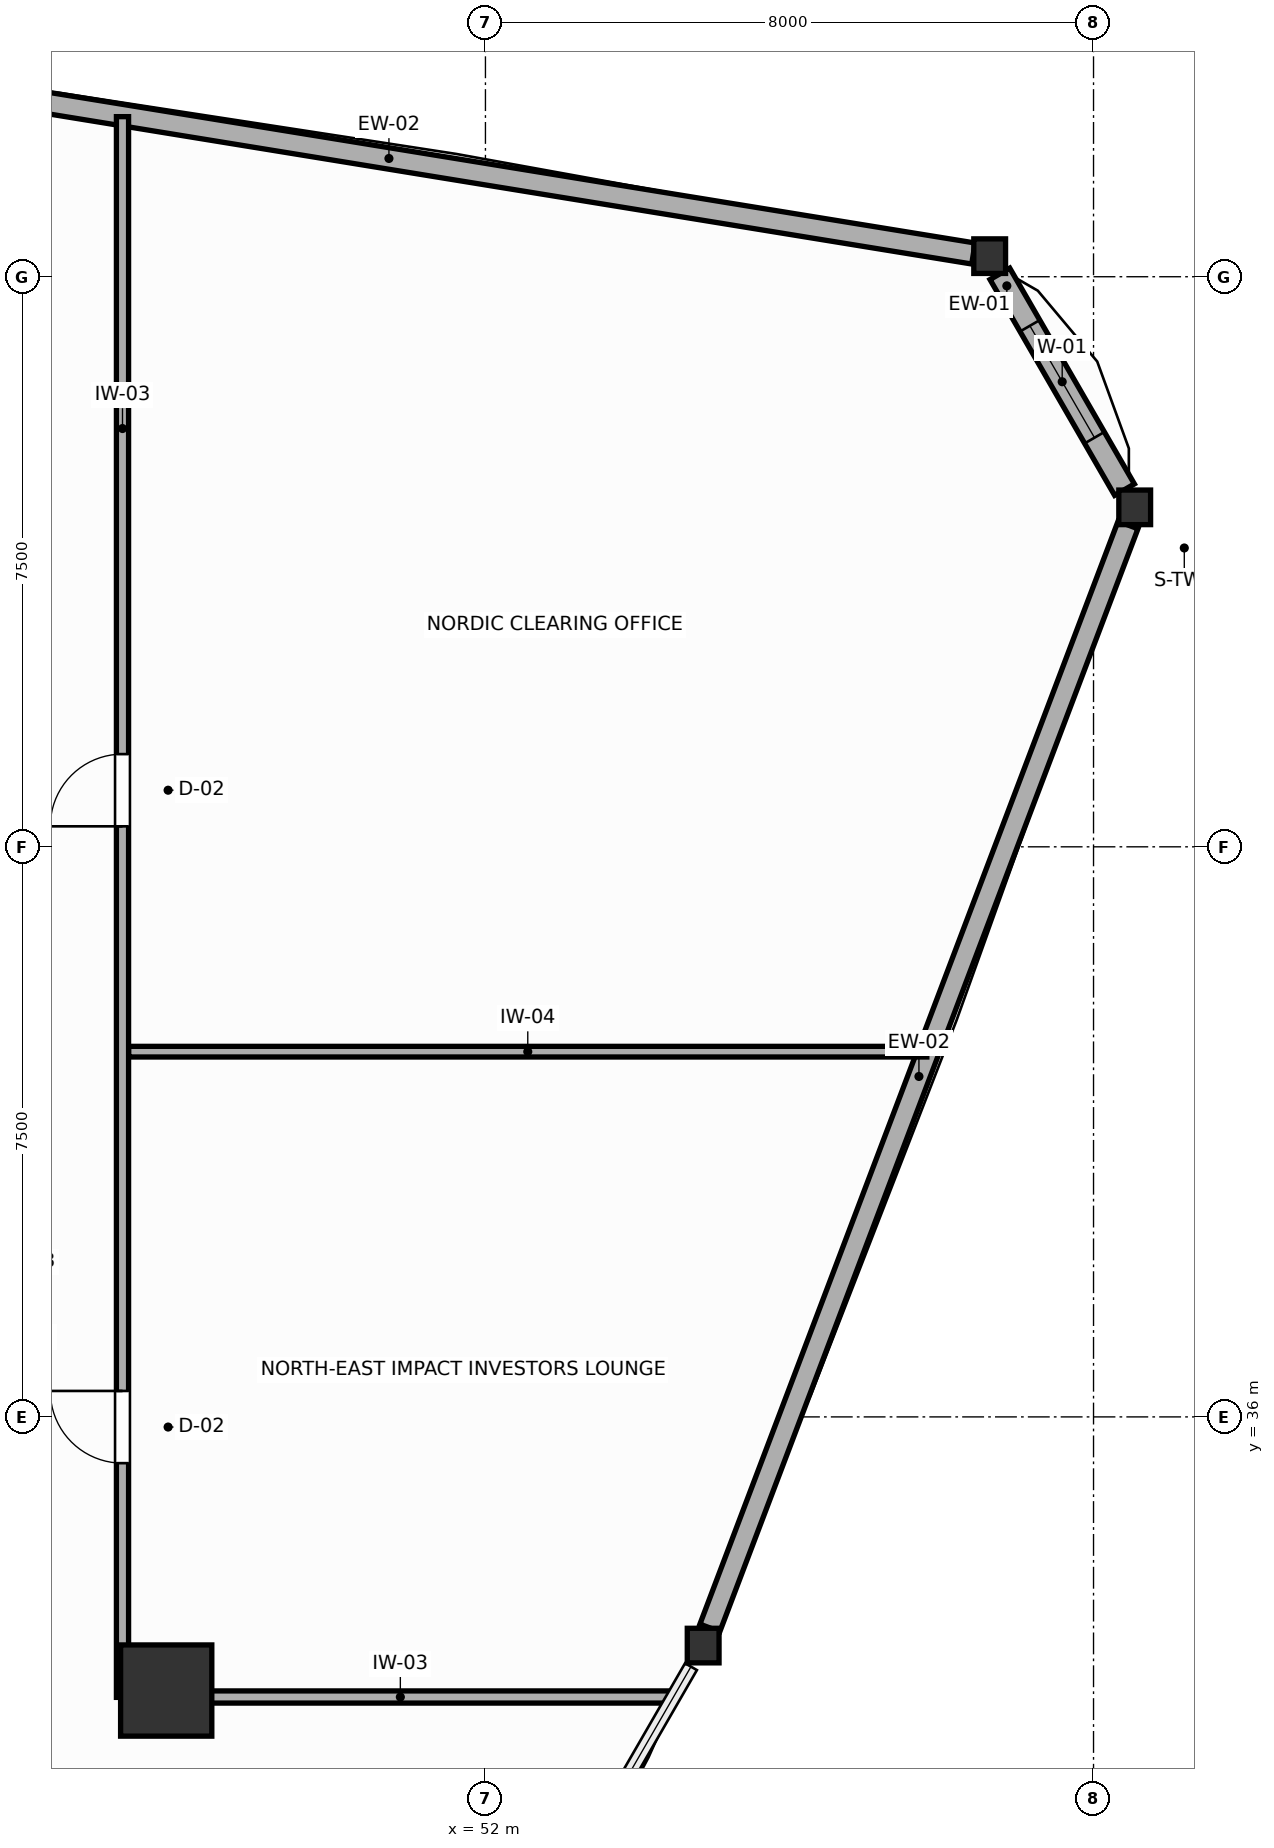
"""IFC4 building model, lengths in metres.
Left out: names, types, materials, properties, quantities, classifications, styles, units other than length and angle.
Written with IfcOpenShell. Run it as: python <this file> out.ifc"""

import sys

from ifc_helpers import new_model, si_unit, direction, frame, frame_2d, origin, origin_2d, place, context, subcontext, project, spatial, rectangle, i_section, extrude, source, transform, mapped, element, fill, save


model = new_model("IFC4")
c1 = context("Model", 3, precision=1e-05, world=origin(), true_north=direction((0.0, 1.0)))
c2 = subcontext(c1, "Body", "Model", "MODEL_VIEW")
j1 = project(units=[si_unit("LENGTHUNIT", "METRE"), si_unit("PLANEANGLEUNIT", "RADIAN")], contexts=[c1])
p1 = place(None, origin())
s1 = spatial("IfcSite", under=j1, at=p1, CompositionType="ELEMENT")
p2 = place(p1, origin())
s2 = spatial("IfcBuilding", under=s1, at=p2, CompositionType="ELEMENT")
p3 = place(p2, frame((0.0, 0.0, 124.2)))
s3 = spatial("IfcBuildingStorey", under=s2, at=p3, CompositionType="ELEMENT", Elevation=124.2)
m1 = source(origin(), c2, "Body", "SweptSolid", [
    extrude(rectangle(XDim=1.2, YDim=1.2, at=origin_2d()), origin(), (0.0, 0.0, 1.0), 3.6),
])
p4 = place(p3, frame((47.8, 32.4, 0.0), z_axis=(0.0, 0.0, 1.0), x_axis=(1.0, 0.0, 0.0)))
e1 = element("IfcColumn", 1, at=p4, inside=s3, PredefinedType="COLUMN", context=c2, shape_type="MappedRepresentation", body=[
    mapped(m1, transform((0.0, 0.0, 0.0), scale=1.0)),
])
m2 = source(origin(), c2, "Body", "SweptSolid", [
    extrude(i_section(OverallWidth=0.418, OverallDepth=0.455, WebThickness=0.039, FlangeThickness=0.063, FilletRadius=0.015, at=origin_2d()), origin(), (0.0, 0.0, 1.0), 3.6),
])
for number, where, z_axis, x_axis in (
    (2, (60.542, 47.966, 0.0), (0.0, 0.0, 1.0), (1.0, 0.0, 0.0)),
    (3, (58.634, 51.271, 0.0), (0.0, 0.0, 1.0), (1.0, 0.0, 0.0)),
    (4, (54.864, 32.991, 0.0), (0.0, 0.0, 1.0), (1.0, 0.0, 0.0)),
):
    element("IfcColumn", number, at=place(p3, frame(where, z_axis=z_axis, x_axis=x_axis)), inside=s3, PredefinedType="COLUMN", context=c2, shape_type="MappedRepresentation", body=[
        mapped(m2, transform((0.0, 0.0, 0.0), scale=1.0)),
    ])
p5 = place(p3, frame((60.408, 48.198, 0.0), z_axis=(0.0, 0.0, 1.0), x_axis=(-0.500014611105, 0.866016967894, 0.0)))
e5 = element("IfcWall", 5, at=p5, inside=s3, PredefinedType="SOLIDWALL", context=c2, shape_type="SweptSolid", body=[
    extrude(rectangle(XDim=3.279, YDim=0.3, at=frame_2d((1.64, 0.0))), origin(), (0.0, 0.0, 1.0), 3.0),
])
p6 = place(p5, frame((0.79, 0.0, 0.75)))
e6 = element("IfcOpeningElement", 6, at=p6, cuts=e5, PredefinedType="OPENING", context=c2, shape_type="SweptSolid", body=[
    extrude(rectangle(XDim=1.7, YDim=1.75, at=frame_2d((0.85, 0.875))), frame((0.0, 0.16, 0.0), z_axis=(0.0, -1.0, 0.0), x_axis=(1.0, 0.0, 0.0)), (0.0, 0.0, 1.0), 0.32),
])
p7 = place(p3, frame((58.42, 51.306, 0.0), z_axis=(0.0, 0.0, 1.0), x_axis=(-0.987036263752, 0.160497395736, 0.0)))
e7 = element("IfcWall", 7, at=p7, inside=s3, PredefinedType="SOLIDWALL", context=c2, shape_type="SweptSolid", body=[
    extrude(rectangle(XDim=15.581, YDim=0.28, at=frame_2d((7.791, 0.0))), origin(), (0.0, 0.0, 1.0), 3.0),
])
p8 = place(p3, frame((54.952, 33.224, 0.0), z_axis=(0.0, 0.0, 1.0), x_axis=(0.354519532047, 0.935048609109, 0.0)))
e8 = element("IfcWall", 8, at=p8, inside=s3, PredefinedType="SOLIDWALL", context=c2, shape_type="SweptSolid", body=[
    extrude(rectangle(XDim=15.517, YDim=0.28, at=frame_2d((7.759, 0.0))), origin(), (0.0, 0.0, 1.0), 3.0),
])
p9 = place(p3, frame((47.225, 32.31, 0.0), z_axis=(0.0, 0.0, 1.0), x_axis=(0.0, 1.0, 0.0)))
e9 = element("IfcWall", 9, at=p9, inside=s3, PredefinedType="PARTITIONING", context=c2, shape_type="SweptSolid", body=[
    extrude(rectangle(XDim=20.796, YDim=0.16, at=frame_2d((10.398, 0.0))), origin(), (0.0, 0.0, 1.0), 3.4),
])
p10 = place(p9, frame((3.082, 0.0, 0.0)))
e10 = element("IfcOpeningElement", 10, at=p10, cuts=e9, PredefinedType="OPENING", context=c2, shape_type="SweptSolid", body=[
    extrude(rectangle(XDim=0.95, YDim=2.05, at=frame_2d((0.475, 1.025))), frame((0.0, 0.09, 0.0), z_axis=(0.0, -1.0, 0.0), x_axis=(1.0, 0.0, 0.0)), (0.0, 0.0, 1.0), 0.18),
])
p11 = place(p9, frame((11.46, 0.0, 0.0)))
e11 = element("IfcOpeningElement", 11, at=p11, cuts=e9, PredefinedType="OPENING", context=c2, shape_type="SweptSolid", body=[
    extrude(rectangle(XDim=0.95, YDim=2.05, at=frame_2d((0.475, 1.025))), frame((0.0, 0.09, 0.0), z_axis=(0.0, -1.0, 0.0), x_axis=(1.0, 0.0, 0.0)), (0.0, 0.0, 1.0), 0.18),
])
p12 = place(p3, frame((47.307, 32.315, 0.0), z_axis=(0.0, 0.0, 1.0), x_axis=(1.0, 0.0, 0.0)))
e12 = element("IfcWall", 12, at=p12, inside=s3, PredefinedType="PARTITIONING", context=c2, shape_type="SweptSolid", body=[
    extrude(rectangle(XDim=7.147, YDim=0.16, at=frame_2d((3.573, 0.0))), origin(), (0.0, 0.0, 1.0), 2.95),
])
p13 = place(p3, frame((47.307, 40.805, 0.0), z_axis=(0.0, 0.0, 1.0), x_axis=(1.0, 0.0, 0.0)))
e13 = element("IfcWall", 13, at=p13, inside=s3, PredefinedType="PARTITIONING", context=c2, shape_type="SweptSolid", body=[
    extrude(rectangle(XDim=10.5, YDim=0.14, at=frame_2d((5.25, 0.0))), origin(), (0.0, 0.0, 1.0), 3.4),
])
p14 = place(p6, origin())
e14 = element("IfcWindow", 14, at=p14, inside=s3, PartitioningType="SINGLE_PANEL", PredefinedType="WINDOW", context=c2, shape_type="SweptSolid", body=[
    extrude(rectangle(XDim=1.7, YDim=1.75, at=frame_2d((0.85, 0.875))), frame((0.0, 0.03, 0.0), z_axis=(0.0, -1.0, 0.0), x_axis=(1.0, 0.0, 0.0)), (0.0, 0.0, 1.0), 0.06),
])
fill(e6, e14)
p15 = place(p10, origin())
e15 = element("IfcDoor", 15, at=p15, inside=s3, OperationType="SINGLE_SWING_RIGHT", PredefinedType="DOOR", context=c2, shape_type="SweptSolid", body=[
    extrude(rectangle(XDim=0.95, YDim=2.05, at=frame_2d((0.475, 1.025))), frame((0.0, 0.025, 0.0), z_axis=(0.0, -1.0, 0.0), x_axis=(1.0, 0.0, 0.0)), (0.0, 0.0, 1.0), 0.05),
])
fill(e10, e15)
p16 = place(p11, origin())
e16 = element("IfcDoor", 16, at=p16, inside=s3, OperationType="SINGLE_SWING_LEFT", PredefinedType="DOOR", context=c2, shape_type="SweptSolid", body=[
    extrude(rectangle(XDim=0.95, YDim=2.05, at=frame_2d((0.475, 1.025))), frame((0.0, 0.025, 0.0), z_axis=(0.0, -1.0, 0.0), x_axis=(1.0, 0.0, 0.0)), (0.0, 0.0, 1.0), 0.05),
])
fill(e11, e16)
save(model, sys.argv[1])
